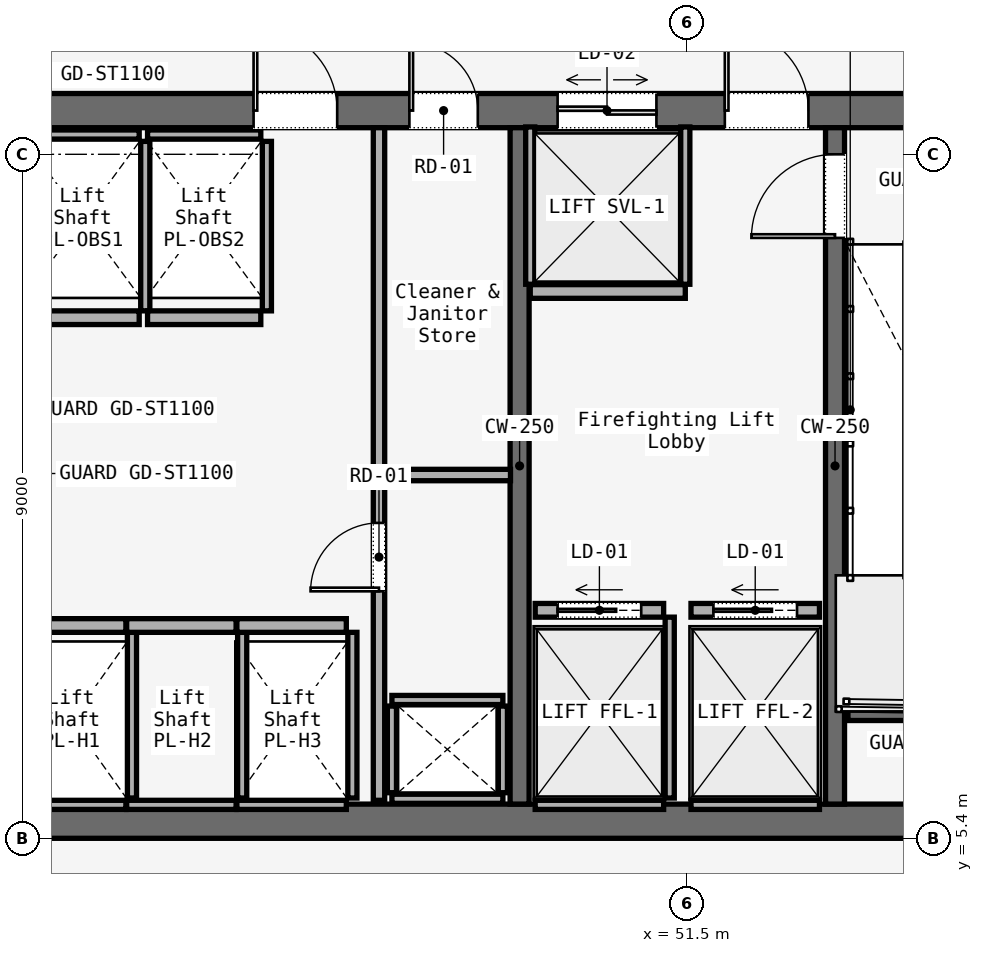
"""IFC4 building model, lengths in metres.
Left out: names, types, materials, properties, quantities, classifications, styles, units other than length and angle.
Written with IfcOpenShell. Run it as: python <this file> out.ifc"""

import sys

from ifc_helpers import new_model, si_unit, direction, frame, frame_2d, origin, place, context, subcontext, project, spatial, rectangle, extrude, element, fill, save


model = new_model("IFC4")
c1 = context("Model", 3, precision=1e-05, world=origin(), true_north=direction((0.0, 1.0)))
c2 = subcontext(c1, "Body", "Model", "MODEL_VIEW")
j1 = project(units=[si_unit("LENGTHUNIT", "METRE"), si_unit("PLANEANGLEUNIT", "RADIAN")], contexts=[c1])
p1 = place(None, origin())
s1 = spatial("IfcSite", under=j1, at=p1, CompositionType="ELEMENT")
p2 = place(p1, origin())
s2 = spatial("IfcBuilding", under=s1, at=p2, CompositionType="ELEMENT")
p3 = place(p2, frame((0.0, 0.0, 12.0)))
s3 = spatial("IfcBuildingStorey", under=s2, at=p3, CompositionType="ELEMENT", Elevation=12.0)
p4 = place(p3, frame((26.45, 14.975, 0.0), z_axis=(0.0, 0.0, 1.0), x_axis=(1.0, 0.0, 0.0)))
e1 = element("IfcWall", 1, at=p4, inside=s3, PredefinedType="SOLIDWALL", context=c2, shape_type="SweptSolid", body=[
    extrude(rectangle(XDim=31.1, YDim=0.45, at=frame_2d((15.55, 0.0))), origin(), (0.0, 0.0, 1.0), 5.7),
])
p5 = place(p4, frame((1.65, 0.0, 0.0)))
e2 = element("IfcOpeningElement", 2, at=p5, cuts=e1, PredefinedType="OPENING", context=c2, shape_type="SweptSolid", body=[
    extrude(rectangle(XDim=1.1, YDim=2.2, at=frame_2d((0.55, 1.1))), frame((0.0, 0.225, 0.0), z_axis=(0.0, -1.0, 0.0), x_axis=(1.0, 0.0, 0.0)), (0.0, 0.0, 1.0), 0.45),
])
p6 = place(p4, frame((13.65, 0.0, 0.0)))
e3 = element("IfcOpeningElement", 3, at=p6, cuts=e1, PredefinedType="OPENING", context=c2, shape_type="SweptSolid", body=[
    extrude(rectangle(XDim=1.1, YDim=2.2, at=frame_2d((0.55, 1.1))), frame((0.0, 0.225, 0.0), z_axis=(0.0, -1.0, 0.0), x_axis=(1.0, 0.0, 0.0)), (0.0, 0.0, 1.0), 0.45),
])
p7 = place(p4, frame((25.55, 0.0, 0.0)))
e4 = element("IfcOpeningElement", 4, at=p7, cuts=e1, PredefinedType="OPENING", context=c2, shape_type="SweptSolid", body=[
    extrude(rectangle(XDim=1.1, YDim=2.2, at=frame_2d((0.55, 1.1))), frame((0.0, 0.225, 0.0), z_axis=(0.0, -1.0, 0.0), x_axis=(1.0, 0.0, 0.0)), (0.0, 0.0, 1.0), 0.45),
])
p8 = place(p4, frame((10.7, 0.0, 0.0)))
e5 = element("IfcOpeningElement", 5, at=p8, cuts=e1, PredefinedType="OPENING", context=c2, shape_type="SweptSolid", body=[
    extrude(rectangle(XDim=1.4, YDim=2.2, at=frame_2d((0.7, 1.1))), frame((0.0, 0.225, 0.0), z_axis=(0.0, -1.0, 0.0), x_axis=(1.0, 0.0, 0.0)), (0.0, 0.0, 1.0), 0.45),
])
p9 = place(p4, frame((19.35, 0.0, 0.0)))
e6 = element("IfcOpeningElement", 6, at=p9, cuts=e1, PredefinedType="OPENING", context=c2, shape_type="SweptSolid", body=[
    extrude(rectangle(XDim=1.1, YDim=2.2, at=frame_2d((0.55, 1.1))), frame((0.0, 0.225, 0.0), z_axis=(0.0, -1.0, 0.0), x_axis=(1.0, 0.0, 0.0)), (0.0, 0.0, 1.0), 0.45),
])
p10 = place(p4, frame((21.4, 0.0, 0.0)))
e7 = element("IfcOpeningElement", 7, at=p10, cuts=e1, PredefinedType="OPENING", context=c2, shape_type="SweptSolid", body=[
    extrude(rectangle(XDim=0.9, YDim=2.1, at=frame_2d((0.45, 1.05))), frame((0.0, 0.225, 0.0), z_axis=(0.0, -1.0, 0.0), x_axis=(1.0, 0.0, 0.0)), (0.0, 0.0, 1.0), 0.45),
])
p11 = place(p4, frame((23.35, 0.0, 0.0)))
e8 = element("IfcOpeningElement", 8, at=p11, cuts=e1, PredefinedType="OPENING", context=c2, shape_type="SweptSolid", body=[
    extrude(rectangle(XDim=1.3, YDim=2.3, at=frame_2d((0.65, 1.15))), frame((0.0, 0.225, 0.0), z_axis=(0.0, -1.0, 0.0), x_axis=(1.0, 0.0, 0.0)), (0.0, 0.0, 1.0), 0.45),
])
p12 = place(p3, frame((26.45, 5.625, 0.0), z_axis=(0.0, 0.0, 1.0), x_axis=(1.0, 0.0, 0.0)))
e9 = element("IfcWall", 9, at=p12, inside=s3, PredefinedType="SOLIDWALL", context=c2, shape_type="SweptSolid", body=[
    extrude(rectangle(XDim=31.1, YDim=0.45, at=frame_2d((15.55, 0.0))), origin(), (0.0, 0.0, 1.0), 5.7),
])
p13 = place(p3, frame((49.3, 5.85, 0.0), z_axis=(0.0, 0.0, 1.0), x_axis=(0.0, 1.0, 0.0)))
e10 = element("IfcWall", 10, at=p13, inside=s3, PredefinedType="SOLIDWALL", context=c2, shape_type="SweptSolid", body=[
    extrude(rectangle(XDim=8.9, YDim=0.25, at=frame_2d((4.45, 0.0))), origin(), (0.0, 0.0, 1.0), 5.7),
])
p14 = place(p3, frame((53.45, 5.85, 0.0), z_axis=(0.0, 0.0, 1.0), x_axis=(0.0, 1.0, 0.0)))
e11 = element("IfcWall", 11, at=p14, inside=s3, PredefinedType="SOLIDWALL", context=c2, shape_type="SweptSolid", body=[
    extrude(rectangle(XDim=8.9, YDim=0.25, at=frame_2d((4.45, 0.0))), origin(), (0.0, 0.0, 1.0), 5.7),
])
p15 = place(p14, frame((7.45, 0.0, 0.0)))
e12 = element("IfcOpeningElement", 12, at=p15, cuts=e11, PredefinedType="OPENING", context=c2, shape_type="SweptSolid", body=[
    extrude(rectangle(XDim=1.1, YDim=2.2, at=frame_2d((0.55, 1.1))), frame((0.0, 0.125, 0.0), z_axis=(0.0, -1.0, 0.0), x_axis=(1.0, 0.0, 0.0)), (0.0, 0.0, 1.0), 0.25),
])
p16 = place(p3, frame((53.62, 7.05, 0.0), z_axis=(0.0, 0.0, 1.0), x_axis=(1.0, 0.0, 0.0)))
e13 = element("IfcWall", 13, at=p16, inside=s3, PredefinedType="SOLIDWALL", context=c2, shape_type="SweptSolid", body=[
    extrude(rectangle(XDim=3.115, YDim=0.2, at=frame_2d((1.558, 0.0))), origin(), (0.0, 0.0, 1.0), 6.0),
])
for number, where, z_axis, x_axis in (
    (14, (47.62, 5.92, 0.0), (0.0, 0.0, 1.0), (1.0, 0.0, 0.0)),
    (15, (47.62, 7.22, 0.0), (0.0, 0.0, 1.0), (1.0, 0.0, 0.0)),
):
    element("IfcWall", number, at=place(p3, frame(where, z_axis=z_axis, x_axis=x_axis)), inside=s3, PredefinedType="SOLIDWALL", context=c2, shape_type="SweptSolid", body=[
        extrude(rectangle(XDim=1.46, YDim=0.12, at=frame_2d((0.73, 0.0))), origin(), (0.0, 0.0, 1.0), 4.819),
    ])
for number, where, z_axis, x_axis in (
    (16, (47.62, 6.0, 0.0), (0.0, 0.0, 1.0), (0.0, 1.0, 0.0)),
    (17, (49.08, 6.0, 0.0), (0.0, 0.0, 1.0), (0.0, 1.0, 0.0)),
):
    element("IfcWall", number, at=place(p3, frame(where, z_axis=z_axis, x_axis=x_axis)), inside=s3, PredefinedType="SOLIDWALL", context=c2, shape_type="SweptSolid", body=[
        extrude(rectangle(XDim=1.14, YDim=0.12, at=frame_2d((0.57, 0.0))), origin(), (0.0, 0.0, 1.0), 4.819),
    ])
p17 = place(p3, frame((47.45, 5.9, 0.0), z_axis=(0.0, 0.0, 1.0), x_axis=(0.0, 1.0, 0.0)))
e18 = element("IfcWall", 18, at=p17, inside=s3, PredefinedType="PARTITIONING", context=c2, shape_type="SweptSolid", body=[
    extrude(rectangle(XDim=8.85, YDim=0.15, at=frame_2d((4.425, 0.0))), origin(), (0.0, 0.0, 1.0), 4.819),
])
p18 = place(p17, frame((2.75, 0.0, 0.0)))
e19 = element("IfcOpeningElement", 19, at=p18, cuts=e18, PredefinedType="OPENING", context=c2, shape_type="SweptSolid", body=[
    extrude(rectangle(XDim=0.9, YDim=2.1, at=frame_2d((0.45, 1.05))), frame((0.0, 0.075, 0.0), z_axis=(0.0, -1.0, 0.0), x_axis=(1.0, 0.0, 0.0)), (0.0, 0.0, 1.0), 0.15),
])
p19 = place(p3, frame((47.45, 10.18, 0.0), z_axis=(0.0, 0.0, 1.0), x_axis=(1.0, 0.0, 0.0)))
e20 = element("IfcWall", 20, at=p19, inside=s3, PredefinedType="PARTITIONING", context=c2, shape_type="SweptSolid", body=[
    extrude(rectangle(XDim=1.73, YDim=0.15, at=frame_2d((0.865, 0.0))), origin(), (0.0, 0.0, 1.0), 4.819),
])
p20 = place(p3, frame((42.78, 8.2, 0.0), z_axis=(0.0, 0.0, 1.0), x_axis=(1.0, 0.0, 0.0)))
e21 = element("IfcWall", 21, at=p20, inside=s3, PredefinedType="SOLIDWALL", context=c2, shape_type="SweptSolid", body=[
    extrude(rectangle(XDim=1.34, YDim=0.18, at=frame_2d((0.67, 0.0))), origin(), (0.0, 0.0, 1.0), 4.819),
])
p21 = place(p3, frame((42.78, 5.84, 0.0), z_axis=(0.0, 0.0, 1.0), x_axis=(1.0, 0.0, 0.0)))
e22 = element("IfcWall", 22, at=p21, inside=s3, PredefinedType="SOLIDWALL", context=c2, shape_type="SweptSolid", body=[
    extrude(rectangle(XDim=1.34, YDim=0.12, at=frame_2d((0.67, 0.0))), origin(), (0.0, 0.0, 1.0), 4.819),
])
p22 = place(p3, frame((44.2, 5.93, 0.0), z_axis=(0.0, 0.0, 1.0), x_axis=(0.0, 1.0, 0.0)))
e23 = element("IfcWall", 23, at=p22, inside=s3, PredefinedType="SOLIDWALL", context=c2, shape_type="SweptSolid", body=[
    extrude(rectangle(XDim=2.18, YDim=0.12, at=frame_2d((1.09, 0.0))), origin(), (0.0, 0.0, 1.0), 4.819),
])
p23 = place(p3, frame((44.13, 8.2, 0.0), z_axis=(0.0, 0.0, 1.0), x_axis=(1.0, 0.0, 0.0)))
e24 = element("IfcWall", 24, at=p23, inside=s3, PredefinedType="SOLIDWALL", context=c2, shape_type="SweptSolid", body=[
    extrude(rectangle(XDim=1.44, YDim=0.18, at=frame_2d((0.72, 0.0))), origin(), (0.0, 0.0, 1.0), 4.819),
])
p24 = place(p3, frame((44.13, 5.84, 0.0), z_axis=(0.0, 0.0, 1.0), x_axis=(1.0, 0.0, 0.0)))
e25 = element("IfcWall", 25, at=p24, inside=s3, PredefinedType="SOLIDWALL", context=c2, shape_type="SweptSolid", body=[
    extrude(rectangle(XDim=1.44, YDim=0.12, at=frame_2d((0.72, 0.0))), origin(), (0.0, 0.0, 1.0), 4.819),
])
p25 = place(p3, frame((45.65, 5.93, 0.0), z_axis=(0.0, 0.0, 1.0), x_axis=(0.0, 1.0, 0.0)))
e26 = element("IfcWall", 26, at=p25, inside=s3, PredefinedType="SOLIDWALL", context=c2, shape_type="SweptSolid", body=[
    extrude(rectangle(XDim=2.18, YDim=0.12, at=frame_2d((1.09, 0.0))), origin(), (0.0, 0.0, 1.0), 4.819),
])
p26 = place(p3, frame((45.58, 8.2, 0.0), z_axis=(0.0, 0.0, 1.0), x_axis=(1.0, 0.0, 0.0)))
e27 = element("IfcWall", 27, at=p26, inside=s3, PredefinedType="SOLIDWALL", context=c2, shape_type="SweptSolid", body=[
    extrude(rectangle(XDim=1.44, YDim=0.18, at=frame_2d((0.72, 0.0))), origin(), (0.0, 0.0, 1.0), 4.819),
])
p27 = place(p3, frame((45.58, 5.84, 0.0), z_axis=(0.0, 0.0, 1.0), x_axis=(1.0, 0.0, 0.0)))
e28 = element("IfcWall", 28, at=p27, inside=s3, PredefinedType="SOLIDWALL", context=c2, shape_type="SweptSolid", body=[
    extrude(rectangle(XDim=1.44, YDim=0.12, at=frame_2d((0.72, 0.0))), origin(), (0.0, 0.0, 1.0), 4.819),
])
p28 = place(p3, frame((47.1, 5.93, 0.0), z_axis=(0.0, 0.0, 1.0), x_axis=(0.0, 1.0, 0.0)))
e29 = element("IfcWall", 29, at=p28, inside=s3, PredefinedType="SOLIDWALL", context=c2, shape_type="SweptSolid", body=[
    extrude(rectangle(XDim=2.18, YDim=0.12, at=frame_2d((1.09, 0.0))), origin(), (0.0, 0.0, 1.0), 4.819),
])
p29 = place(p3, frame((42.805, 12.25, 0.0), z_axis=(0.0, 0.0, 1.0), x_axis=(1.0, 0.0, 0.0)))
e30 = element("IfcWall", 30, at=p29, inside=s3, PredefinedType="SOLIDWALL", context=c2, shape_type="SweptSolid", body=[
    extrude(rectangle(XDim=1.49, YDim=0.18, at=frame_2d((0.745, 0.0))), origin(), (0.0, 0.0, 1.0), 4.819),
])
p30 = place(p3, frame((42.805, 14.66, 0.0), z_axis=(0.0, 0.0, 1.0), x_axis=(1.0, 0.0, 0.0)))
e31 = element("IfcWall", 31, at=p30, inside=s3, PredefinedType="SOLIDWALL", context=c2, shape_type="SweptSolid", body=[
    extrude(rectangle(XDim=1.49, YDim=0.12, at=frame_2d((0.745, 0.0))), origin(), (0.0, 0.0, 1.0), 4.819),
])
p31 = place(p3, frame((44.375, 12.34, 0.0), z_axis=(0.0, 0.0, 1.0), x_axis=(0.0, 1.0, 0.0)))
e32 = element("IfcWall", 32, at=p31, inside=s3, PredefinedType="SOLIDWALL", context=c2, shape_type="SweptSolid", body=[
    extrude(rectangle(XDim=2.23, YDim=0.12, at=frame_2d((1.115, 0.0))), origin(), (0.0, 0.0, 1.0), 4.819),
])
p32 = place(p3, frame((44.405, 12.25, 0.0), z_axis=(0.0, 0.0, 1.0), x_axis=(1.0, 0.0, 0.0)))
e33 = element("IfcWall", 33, at=p32, inside=s3, PredefinedType="SOLIDWALL", context=c2, shape_type="SweptSolid", body=[
    extrude(rectangle(XDim=1.49, YDim=0.18, at=frame_2d((0.745, 0.0))), origin(), (0.0, 0.0, 1.0), 4.819),
])
p33 = place(p3, frame((44.405, 14.66, 0.0), z_axis=(0.0, 0.0, 1.0), x_axis=(1.0, 0.0, 0.0)))
e34 = element("IfcWall", 34, at=p33, inside=s3, PredefinedType="SOLIDWALL", context=c2, shape_type="SweptSolid", body=[
    extrude(rectangle(XDim=1.49, YDim=0.12, at=frame_2d((0.745, 0.0))), origin(), (0.0, 0.0, 1.0), 4.819),
])
p34 = place(p3, frame((45.975, 12.34, 0.0), z_axis=(0.0, 0.0, 1.0), x_axis=(0.0, 1.0, 0.0)))
e35 = element("IfcWall", 35, at=p34, inside=s3, PredefinedType="SOLIDWALL", context=c2, shape_type="SweptSolid", body=[
    extrude(rectangle(XDim=2.23, YDim=0.12, at=frame_2d((1.115, 0.0))), origin(), (0.0, 0.0, 1.0), 4.819),
])
p35 = place(p3, frame((49.505, 8.4, 0.0), z_axis=(0.0, 0.0, 1.0), x_axis=(1.0, 0.0, 0.0)))
e36 = element("IfcWall", 36, at=p35, inside=s3, PredefinedType="SOLIDWALL", context=c2, shape_type="SweptSolid", body=[
    extrude(rectangle(XDim=1.69, YDim=0.18, at=frame_2d((0.845, 0.0))), origin(), (0.0, 0.0, 1.0), 4.819),
])
p36 = place(p35, frame((0.295, 0.0, 0.0)))
e37 = element("IfcOpeningElement", 37, at=p36, cuts=e36, PredefinedType="OPENING", context=c2, shape_type="SweptSolid", body=[
    extrude(rectangle(XDim=1.1, YDim=2.2, at=frame_2d((0.55, 1.1))), frame((0.0, 0.09, 0.0), z_axis=(0.0, -1.0, 0.0), x_axis=(1.0, 0.0, 0.0)), (0.0, 0.0, 1.0), 0.18),
])
p37 = place(p3, frame((49.505, 5.84, 0.0), z_axis=(0.0, 0.0, 1.0), x_axis=(1.0, 0.0, 0.0)))
e38 = element("IfcWall", 38, at=p37, inside=s3, PredefinedType="SOLIDWALL", context=c2, shape_type="SweptSolid", body=[
    extrude(rectangle(XDim=1.69, YDim=0.12, at=frame_2d((0.845, 0.0))), origin(), (0.0, 0.0, 1.0), 4.819),
])
p38 = place(p3, frame((51.275, 5.93, 0.0), z_axis=(0.0, 0.0, 1.0), x_axis=(0.0, 1.0, 0.0)))
e39 = element("IfcWall", 39, at=p38, inside=s3, PredefinedType="SOLIDWALL", context=c2, shape_type="SweptSolid", body=[
    extrude(rectangle(XDim=2.38, YDim=0.12, at=frame_2d((1.19, 0.0))), origin(), (0.0, 0.0, 1.0), 4.819),
])
p39 = place(p3, frame((51.555, 8.4, 0.0), z_axis=(0.0, 0.0, 1.0), x_axis=(1.0, 0.0, 0.0)))
e40 = element("IfcWall", 40, at=p39, inside=s3, PredefinedType="SOLIDWALL", context=c2, shape_type="SweptSolid", body=[
    extrude(rectangle(XDim=1.69, YDim=0.18, at=frame_2d((0.845, 0.0))), origin(), (0.0, 0.0, 1.0), 4.819),
])
p40 = place(p39, frame((0.295, 0.0, 0.0)))
e41 = element("IfcOpeningElement", 41, at=p40, cuts=e40, PredefinedType="OPENING", context=c2, shape_type="SweptSolid", body=[
    extrude(rectangle(XDim=1.1, YDim=2.2, at=frame_2d((0.55, 1.1))), frame((0.0, 0.09, 0.0), z_axis=(0.0, -1.0, 0.0), x_axis=(1.0, 0.0, 0.0)), (0.0, 0.0, 1.0), 0.18),
])
p41 = place(p3, frame((51.555, 5.84, 0.0), z_axis=(0.0, 0.0, 1.0), x_axis=(1.0, 0.0, 0.0)))
e42 = element("IfcWall", 42, at=p41, inside=s3, PredefinedType="SOLIDWALL", context=c2, shape_type="SweptSolid", body=[
    extrude(rectangle(XDim=1.69, YDim=0.12, at=frame_2d((0.845, 0.0))), origin(), (0.0, 0.0, 1.0), 4.819),
])
p42 = place(p3, frame((49.44, 12.595, 0.0), z_axis=(0.0, 0.0, 1.0), x_axis=(1.0, 0.0, 0.0)))
e43 = element("IfcWall", 43, at=p42, inside=s3, PredefinedType="SOLIDWALL", context=c2, shape_type="SweptSolid", body=[
    extrude(rectangle(XDim=2.04, YDim=0.18, at=frame_2d((1.02, 0.0))), origin(), (0.0, 0.0, 1.0), 4.819),
])
for number, where, z_axis, x_axis in (
    (44, (49.44, 12.69, 0.0), (0.0, 0.0, 1.0), (0.0, 1.0, 0.0)),
    (45, (51.48, 12.69, 0.0), (0.0, 0.0, 1.0), (0.0, 1.0, 0.0)),
):
    element("IfcWall", number, at=place(p3, frame(where, z_axis=z_axis, x_axis=x_axis)), inside=s3, PredefinedType="SOLIDWALL", context=c2, shape_type="SweptSolid", body=[
        extrude(rectangle(XDim=2.07, YDim=0.12, at=frame_2d((1.035, 0.0))), origin(), (0.0, 0.0, 1.0), 4.819),
    ])
p43 = place(p7, origin())
e46 = element("IfcDoor", 46, at=p43, inside=s3, OperationType="SINGLE_SWING_RIGHT", PredefinedType="DOOR", context=c2, shape_type="SweptSolid", body=[
    extrude(rectangle(XDim=1.1, YDim=2.2, at=frame_2d((0.55, 1.1))), frame((0.0, 0.025, 0.0), z_axis=(0.0, -1.0, 0.0), x_axis=(1.0, 0.0, 0.0)), (0.0, 0.0, 1.0), 0.05),
])
fill(e4, e46)
p44 = place(p9, origin())
e47 = element("IfcDoor", 47, at=p44, inside=s3, OperationType="SINGLE_SWING_LEFT", PredefinedType="DOOR", context=c2, shape_type="SweptSolid", body=[
    extrude(rectangle(XDim=1.1, YDim=2.2, at=frame_2d((0.55, 1.1))), frame((0.0, 0.025, 0.0), z_axis=(0.0, -1.0, 0.0), x_axis=(1.0, 0.0, 0.0)), (0.0, 0.0, 1.0), 0.05),
])
fill(e6, e47)
p45 = place(p10, origin())
e48 = element("IfcDoor", 48, at=p45, inside=s3, OperationType="SINGLE_SWING_LEFT", PredefinedType="DOOR", context=c2, shape_type="SweptSolid", body=[
    extrude(rectangle(XDim=0.9, YDim=2.1, at=frame_2d((0.45, 1.05))), frame((0.0, 0.025, 0.0), z_axis=(0.0, -1.0, 0.0), x_axis=(1.0, 0.0, 0.0)), (0.0, 0.0, 1.0), 0.05),
])
fill(e7, e48)
p46 = place(p15, origin())
e49 = element("IfcDoor", 49, at=p46, inside=s3, OperationType="SINGLE_SWING_LEFT", PredefinedType="DOOR", context=c2, shape_type="SweptSolid", body=[
    extrude(rectangle(XDim=1.1, YDim=2.2, at=frame_2d((0.55, 1.1))), frame((0.0, 0.025, 0.0), z_axis=(0.0, -1.0, 0.0), x_axis=(1.0, 0.0, 0.0)), (0.0, 0.0, 1.0), 0.05),
])
fill(e12, e49)
p47 = place(p18, origin())
e50 = element("IfcDoor", 50, at=p47, inside=s3, OperationType="SINGLE_SWING_RIGHT", PredefinedType="DOOR", context=c2, shape_type="SweptSolid", body=[
    extrude(rectangle(XDim=0.9, YDim=2.1, at=frame_2d((0.45, 1.05))), frame((0.0, 0.025, 0.0), z_axis=(0.0, -1.0, 0.0), x_axis=(1.0, 0.0, 0.0)), (0.0, 0.0, 1.0), 0.05),
])
fill(e19, e50)
p48 = place(p36, origin())
e51 = element("IfcDoor", 51, at=p48, inside=s3, OperationType="SLIDING_TO_LEFT", PredefinedType="DOOR", context=c2, shape_type="SweptSolid", body=[
    extrude(rectangle(XDim=1.1, YDim=2.2, at=frame_2d((0.55, 1.1))), frame((0.0, 0.025, 0.0), z_axis=(0.0, -1.0, 0.0), x_axis=(1.0, 0.0, 0.0)), (0.0, 0.0, 1.0), 0.05),
])
fill(e37, e51)
p49 = place(p40, origin())
e52 = element("IfcDoor", 52, at=p49, inside=s3, OperationType="SLIDING_TO_LEFT", PredefinedType="DOOR", context=c2, shape_type="SweptSolid", body=[
    extrude(rectangle(XDim=1.1, YDim=2.2, at=frame_2d((0.55, 1.1))), frame((0.0, 0.025, 0.0), z_axis=(0.0, -1.0, 0.0), x_axis=(1.0, 0.0, 0.0)), (0.0, 0.0, 1.0), 0.05),
])
fill(e41, e52)
p50 = place(p11, origin())
e53 = element("IfcDoor", 53, at=p50, inside=s3, OperationType="DOUBLE_DOOR_SLIDING", PredefinedType="DOOR", context=c2, shape_type="SweptSolid", body=[
    extrude(rectangle(XDim=1.3, YDim=2.3, at=frame_2d((0.65, 1.15))), frame((0.0, 0.025, 0.0), z_axis=(0.0, -1.0, 0.0), x_axis=(1.0, 0.0, 0.0)), (0.0, 0.0, 1.0), 0.05),
])
fill(e8, e53)
save(model, sys.argv[1])
